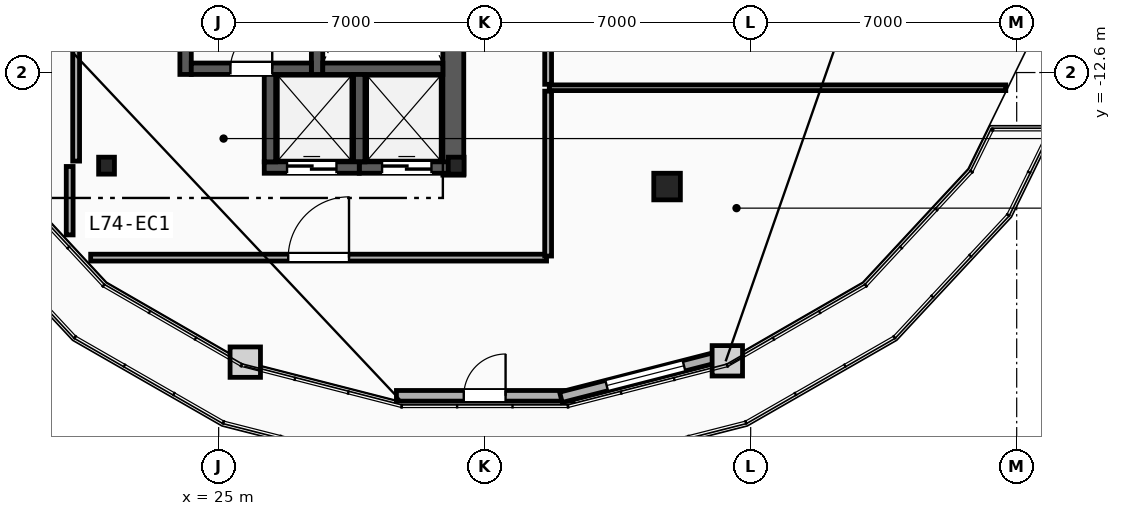
"""IFC4 building model, lengths in metres.
Left out: names, types, materials, properties, quantities, classifications, styles, units other than length and angle.
Written with IfcOpenShell. Run it as: python <this file> out.ifc"""

import sys

from ifc_helpers import new_model, si_unit, direction, frame, frame_2d, origin, origin_2d, place, context, subcontext, project, spatial, rectangle, i_section, extrude, element, fill, save


model = new_model("IFC4")
c1 = context("Model", 3, precision=1e-05, world=origin(), true_north=direction((0.0, 1.0)))
c2 = subcontext(c1, "Body", "Model", "MODEL_VIEW")
j1 = project(units=[si_unit("LENGTHUNIT", "METRE"), si_unit("PLANEANGLEUNIT", "RADIAN")], contexts=[c1])
p1 = place(None, origin())
s1 = spatial("IfcSite", under=j1, at=p1, CompositionType="ELEMENT")
p2 = place(p1, origin())
s2 = spatial("IfcBuilding", under=s1, at=p2, CompositionType="ELEMENT")
p3 = place(p2, frame((0.0, 0.0, 279.2)))
s3 = spatial("IfcBuildingStorey", under=s2, at=p3, CompositionType="ELEMENT", Elevation=279.2)
for number, where, z_axis, x_axis in (
    (1, (22.05, -15.05, 0.0), (0.0, 0.0, 1.0), (1.0, 0.0, 0.0)),
    (2, (31.25, -15.05, 0.0), (0.0, 0.0, 1.0), (1.0, 0.0, 0.0)),
):
    element("IfcColumn", number, at=place(p3, frame(where, z_axis=z_axis, x_axis=x_axis)), inside=s3, PredefinedType="COLUMN", context=c2, shape_type="SweptSolid", body=[
        extrude(i_section(OverallWidth=0.416, OverallDepth=0.446, WebThickness=0.039, FlangeThickness=0.063, FilletRadius=0.018, at=origin_2d()), origin(), (0.0, 0.0, 1.0), 3.6),
    ])
p4 = place(p3, frame((36.8, -15.6, 0.0), z_axis=(0.0, 0.0, 1.0), x_axis=(1.0, 0.0, 0.0)))
e3 = element("IfcColumn", 3, at=p4, inside=s3, PredefinedType="COLUMN", context=c2, shape_type="SweptSolid", body=[
    extrude(rectangle(XDim=0.7, YDim=0.7, at=origin_2d()), origin(), (0.0, 0.0, 1.0), 3.6),
])
p5 = place(p3, frame((29.678, -21.106, 0.0), z_axis=(0.0, 0.0, 1.0), x_axis=(1.0, 0.0, 0.0)))
e4 = element("IfcWall", 4, at=p5, inside=s3, PredefinedType="SOLIDWALL", context=c2, shape_type="SweptSolid", body=[
    extrude(rectangle(XDim=4.644, YDim=0.28, at=frame_2d((2.322, 0.0))), origin(), (0.0, 0.0, 1.0), 3.34),
])
p6 = place(p5, frame((1.772, 0.0, 0.0)))
e5 = element("IfcOpeningElement", 5, at=p6, cuts=e4, PredefinedType="OPENING", context=c2, shape_type="SweptSolid", body=[
    extrude(rectangle(XDim=1.1, YDim=2.2, at=frame_2d((0.55, 1.1))), frame((0.0, 0.15, 0.0), z_axis=(0.0, -1.0, 0.0), x_axis=(1.0, 0.0, 0.0)), (0.0, 0.0, 1.0), 0.3),
])
p7 = place(p3, frame((34.007, -21.146, 0.0), z_axis=(0.0, 0.0, 1.0), x_axis=(0.968658938671, 0.248394566232, 0.0)))
e6 = element("IfcWall", 6, at=p7, inside=s3, PredefinedType="SOLIDWALL", context=c2, shape_type="SweptSolid", body=[
    extrude(rectangle(XDim=4.585, YDim=0.28, at=frame_2d((2.292, 0.0))), origin(), (0.0, 0.0, 1.0), 3.34),
])
p8 = place(p7, frame((1.243, 0.0, 0.3)))
e7 = element("IfcOpeningElement", 7, at=p8, cuts=e6, PredefinedType="OPENING", context=c2, shape_type="SweptSolid", body=[
    extrude(rectangle(XDim=2.1, YDim=2.6, at=frame_2d((1.05, 1.3))), frame((0.0, 0.15, 0.0), z_axis=(0.0, -1.0, 0.0), x_axis=(1.0, 0.0, 0.0)), (0.0, 0.0, 1.0), 0.3),
])
p9 = place(p3, frame((31.175, -15.3, 0.0), z_axis=(0.0, 0.0, 1.0), x_axis=(0.0, 1.0, 0.0)))
e8 = element("IfcWall", 8, at=p9, inside=s3, PredefinedType="SHEAR", context=c2, shape_type="SweptSolid", body=[
    extrude(rectangle(XDim=13.33, YDim=0.55, at=frame_2d((6.665, 0.0))), origin(), (0.0, 0.0, 1.0), 3.34),
])
for number, where, z_axis, x_axis in (
    (9, (27.59, -12.65, 0.0), (0.0, 0.0, 1.0), (0.0, 1.0, 0.0)),
    (10, (24.13, -12.65, 0.0), (0.0, 0.0, 1.0), (0.0, 1.0, 0.0)),
):
    element("IfcWall", number, at=place(p3, frame(where, z_axis=z_axis, x_axis=x_axis)), inside=s3, PredefinedType="SHEAR", context=c2, shape_type="SweptSolid", body=[
        extrude(rectangle(XDim=10.68, YDim=0.3, at=frame_2d((5.34, 0.0))), origin(), (0.0, 0.0, 1.0), 3.34),
    ])
p10 = place(p3, frame((27.74, -12.5, 0.0), z_axis=(0.0, 0.0, 1.0), x_axis=(1.0, 0.0, 0.0)))
e11 = element("IfcWall", 11, at=p10, inside=s3, PredefinedType="SHEAR", context=c2, shape_type="SweptSolid", body=[
    extrude(rectangle(XDim=3.16, YDim=0.3, at=frame_2d((1.58, 0.0))), origin(), (0.0, 0.0, 1.0), 3.34),
])
p11 = place(p3, frame((24.28, -12.5, 0.0), z_axis=(0.0, 0.0, 1.0), x_axis=(1.0, 0.0, 0.0)))
e12 = element("IfcWall", 12, at=p11, inside=s3, PredefinedType="SHEAR", context=c2, shape_type="SweptSolid", body=[
    extrude(rectangle(XDim=3.16, YDim=0.3, at=frame_2d((1.58, 0.0))), origin(), (0.0, 0.0, 1.0), 3.34),
])
p12 = place(p11, frame((1.03, 0.0, 0.0)))
e13 = element("IfcOpeningElement", 13, at=p12, cuts=e12, PredefinedType="OPENING", context=c2, shape_type="SweptSolid", body=[
    extrude(rectangle(XDim=1.1, YDim=2.15, at=frame_2d((0.55, 1.075))), frame((0.0, 0.16, 0.0), z_axis=(0.0, -1.0, 0.0), x_axis=(1.0, 0.0, 0.0)), (0.0, 0.0, 1.0), 0.32),
])
p13 = place(p3, frame((28.7, -15.1, 0.0), z_axis=(0.0, 0.0, 1.0), x_axis=(1.0, 0.0, 0.0)))
e14 = element("IfcWall", 14, at=p13, inside=s3, PredefinedType="SHEAR", context=c2, shape_type="SweptSolid", body=[
    extrude(rectangle(XDim=2.5, YDim=0.3, at=frame_2d((1.25, 0.0))), origin(), (0.0, 0.0, 1.0), 3.34),
])
p14 = place(p13, frame((0.6, 0.0, 0.0)))
e15 = element("IfcOpeningElement", 15, at=p14, cuts=e14, PredefinedType="OPENING", context=c2, shape_type="SweptSolid", body=[
    extrude(rectangle(XDim=1.3, YDim=2.2, at=frame_2d((0.65, 1.1))), frame((0.0, 0.16, 0.0), z_axis=(0.0, -1.0, 0.0), x_axis=(1.0, 0.0, 0.0)), (0.0, 0.0, 1.0), 0.32),
])
p15 = place(p3, frame((28.7, -14.95, 0.0), z_axis=(0.0, 0.0, 1.0), x_axis=(0.0, 1.0, 0.0)))
e16 = element("IfcWall", 16, at=p15, inside=s3, PredefinedType="SHEAR", context=c2, shape_type="SweptSolid", body=[
    extrude(rectangle(XDim=2.3, YDim=0.3, at=frame_2d((1.15, 0.0))), origin(), (0.0, 0.0, 1.0), 3.34),
])
p16 = place(p3, frame((26.2, -15.1, 0.0), z_axis=(0.0, 0.0, 1.0), x_axis=(1.0, 0.0, 0.0)))
e17 = element("IfcWall", 17, at=p16, inside=s3, PredefinedType="SHEAR", context=c2, shape_type="SweptSolid", body=[
    extrude(rectangle(XDim=2.5, YDim=0.3, at=frame_2d((1.25, 0.0))), origin(), (0.0, 0.0, 1.0), 3.34),
])
p17 = place(p16, frame((0.6, 0.0, 0.0)))
e18 = element("IfcOpeningElement", 18, at=p17, cuts=e17, PredefinedType="OPENING", context=c2, shape_type="SweptSolid", body=[
    extrude(rectangle(XDim=1.3, YDim=2.2, at=frame_2d((0.65, 1.1))), frame((0.0, 0.16, 0.0), z_axis=(0.0, -1.0, 0.0), x_axis=(1.0, 0.0, 0.0)), (0.0, 0.0, 1.0), 0.32),
])
p18 = place(p3, frame((26.35, -14.95, 0.0), z_axis=(0.0, 0.0, 1.0), x_axis=(0.0, 1.0, 0.0)))
e19 = element("IfcWall", 19, at=p18, inside=s3, PredefinedType="SHEAR", context=c2, shape_type="SweptSolid", body=[
    extrude(rectangle(XDim=2.3, YDim=0.3, at=frame_2d((1.15, 0.0))), origin(), (0.0, 0.0, 1.0), 3.34),
])
p19 = place(p3, frame((21.25, -14.93, 0.0), z_axis=(0.0, 0.0, 1.0), x_axis=(0.0, 1.0, 0.0)))
e20 = element("IfcWall", 20, at=p19, inside=s3, PredefinedType="PARTITIONING", context=c2, shape_type="SweptSolid", body=[
    extrude(rectangle(XDim=4.36, YDim=0.18, at=frame_2d((2.18, 0.0))), origin(), (0.0, 0.0, 1.0), 3.34),
])
p20 = place(p3, frame((33.7, -13.0, 0.0), z_axis=(0.0, 0.0, 1.0), x_axis=(1.0, 0.0, 0.0)))
e21 = element("IfcWall", 21, at=p20, inside=s3, PredefinedType="PARTITIONING", context=c2, shape_type="SweptSolid", body=[
    extrude(rectangle(XDim=12.013, YDim=0.15, at=frame_2d((6.006, 0.0))), origin(), (0.0, 0.0, 1.0), 3.34),
])
p21 = place(p3, frame((21.632, -17.47, 0.0), z_axis=(0.0, 0.0, 1.0), x_axis=(1.0, 0.0, 0.0)))
e22 = element("IfcWall", 22, at=p21, inside=s3, PredefinedType="PARTITIONING", context=c2, shape_type="SweptSolid", body=[
    extrude(rectangle(XDim=11.996, YDim=0.18, at=frame_2d((5.998, 0.0))), origin(), (0.0, 0.0, 1.0), 3.34),
])
p22 = place(p21, frame((5.198, 0.0, 0.0)))
e23 = element("IfcOpeningElement", 23, at=p22, cuts=e22, PredefinedType="OPENING", context=c2, shape_type="SweptSolid", body=[
    extrude(rectangle(XDim=1.6, YDim=2.2, at=frame_2d((0.8, 1.1))), frame((0.0, 0.1, 0.0), z_axis=(0.0, -1.0, 0.0), x_axis=(1.0, 0.0, 0.0)), (0.0, 0.0, 1.0), 0.2),
])
p23 = place(p3, frame((33.67, -17.428, 0.0), z_axis=(0.0, 0.0, 1.0), x_axis=(0.0, 1.0, 0.0)))
e24 = element("IfcWall", 24, at=p23, inside=s3, PredefinedType="PARTITIONING", context=c2, shape_type="SweptSolid", body=[
    extrude(rectangle(XDim=4.338, YDim=0.18, at=frame_2d((2.169, 0.0))), origin(), (0.0, 0.0, 1.0), 3.34),
])
p24 = place(p3, frame((33.67, -12.91, 0.0), z_axis=(0.0, 0.0, 1.0), x_axis=(0.0, 1.0, 0.0)))
e25 = element("IfcWall", 25, at=p24, inside=s3, PredefinedType="PARTITIONING", context=c2, shape_type="SweptSolid", body=[
    extrude(rectangle(XDim=3.559, YDim=0.18, at=frame_2d((1.779, 0.0))), origin(), (0.0, 0.0, 1.0), 3.34),
])
p25 = place(p24, frame((1.279, 0.0, 0.0)))
e26 = element("IfcOpeningElement", 26, at=p25, cuts=e25, PredefinedType="OPENING", context=c2, shape_type="SweptSolid", body=[
    extrude(rectangle(XDim=1.0, YDim=2.15, at=frame_2d((0.5, 1.075))), frame((0.0, 0.1, 0.0), z_axis=(0.0, -1.0, 0.0), x_axis=(1.0, 0.0, 0.0)), (0.0, 0.0, 1.0), 0.2),
])
p26 = place(p3, frame((21.08, -15.072, 0.0), z_axis=(0.0, 0.0, 1.0), x_axis=(0.0, -1.0, 0.0)))
e27 = element("IfcWall", 27, at=p26, inside=s3, PredefinedType="PARTITIONING", context=c2, shape_type="SweptSolid", body=[
    extrude(rectangle(XDim=1.801, YDim=0.18, at=frame_2d((0.9, 0.0))), origin(), (0.0, 0.0, 1.0), 3.34),
])
p27 = place(p6, origin())
e28 = element("IfcDoor", 28, at=p27, inside=s3, OperationType="SINGLE_SWING_RIGHT", PredefinedType="DOOR", context=c2, shape_type="SweptSolid", body=[
    extrude(rectangle(XDim=1.1, YDim=2.2, at=frame_2d((0.55, 1.1))), frame((0.0, 0.025, 0.0), z_axis=(0.0, -1.0, 0.0), x_axis=(1.0, 0.0, 0.0)), (0.0, 0.0, 1.0), 0.05),
])
fill(e5, e28)
p28 = place(p8, origin())
e29 = element("IfcWindow", 29, at=p28, inside=s3, PartitioningType="SINGLE_PANEL", PredefinedType="WINDOW", context=c2, shape_type="SweptSolid", body=[
    extrude(rectangle(XDim=2.1, YDim=2.6, at=frame_2d((1.05, 1.3))), frame((0.0, 0.03, 0.0), z_axis=(0.0, -1.0, 0.0), x_axis=(1.0, 0.0, 0.0)), (0.0, 0.0, 1.0), 0.06),
])
fill(e7, e29)
p29 = place(p12, origin())
e30 = element("IfcDoor", 30, at=p29, inside=s3, OperationType="SINGLE_SWING_RIGHT", PredefinedType="DOOR", context=c2, shape_type="SweptSolid", body=[
    extrude(rectangle(XDim=1.1, YDim=2.15, at=frame_2d((0.55, 1.075))), frame((0.0, 0.025, 0.0), z_axis=(0.0, -1.0, 0.0), x_axis=(1.0, 0.0, 0.0)), (0.0, 0.0, 1.0), 0.05),
])
fill(e13, e30)
p30 = place(p14, origin())
e31 = element("IfcDoor", 31, at=p30, inside=s3, OperationType="SLIDING_TO_LEFT", PredefinedType="TRAPDOOR", context=c2, shape_type="SweptSolid", body=[
    extrude(rectangle(XDim=1.3, YDim=2.2, at=frame_2d((0.65, 1.1))), frame((0.0, 0.025, 0.0), z_axis=(0.0, -1.0, 0.0), x_axis=(1.0, 0.0, 0.0)), (0.0, 0.0, 1.0), 0.05),
])
fill(e15, e31)
p31 = place(p17, origin())
e32 = element("IfcDoor", 32, at=p31, inside=s3, OperationType="SLIDING_TO_LEFT", PredefinedType="TRAPDOOR", context=c2, shape_type="SweptSolid", body=[
    extrude(rectangle(XDim=1.3, YDim=2.2, at=frame_2d((0.65, 1.1))), frame((0.0, 0.025, 0.0), z_axis=(0.0, -1.0, 0.0), x_axis=(1.0, 0.0, 0.0)), (0.0, 0.0, 1.0), 0.05),
])
fill(e18, e32)
p32 = place(p22, origin())
e33 = element("IfcDoor", 33, at=p32, inside=s3, OperationType="SINGLE_SWING_RIGHT", PredefinedType="DOOR", context=c2, shape_type="SweptSolid", body=[
    extrude(rectangle(XDim=1.6, YDim=2.2, at=frame_2d((0.8, 1.1))), frame((0.0, 0.025, 0.0), z_axis=(0.0, -1.0, 0.0), x_axis=(1.0, 0.0, 0.0)), (0.0, 0.0, 1.0), 0.05),
])
fill(e23, e33)
save(model, sys.argv[1])
